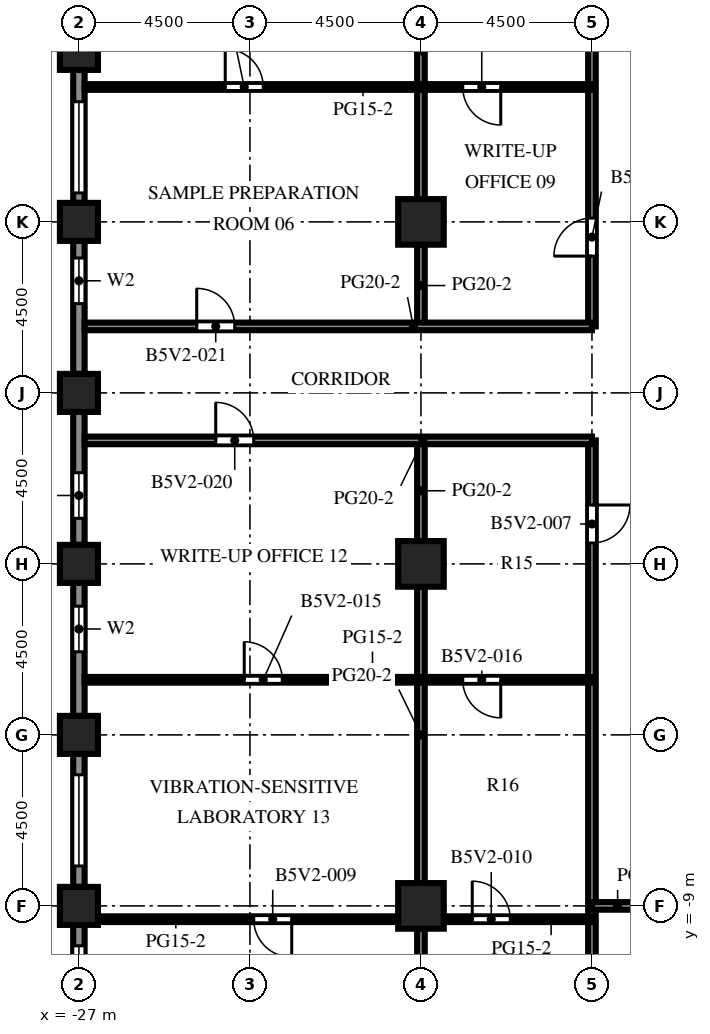
"""IFC4 building model, lengths in metres.
Left out: names, types, materials, properties, quantities, classifications, styles, units other than length and angle.
Written with IfcOpenShell. Run it as: python <this file> out.ifc"""

import sys

from ifc_helpers import new_model, si_unit, direction, frame, frame_2d, origin, origin_2d, place, context, subcontext, project, spatial, rectangle, extrude, element, fill, save


model = new_model("IFC4")
c1 = context("Model", 3, precision=1e-05, world=origin(), true_north=direction((0.0, 1.0)))
c2 = subcontext(c1, "Body", "Model", "MODEL_VIEW")
j1 = project(units=[si_unit("LENGTHUNIT", "METRE"), si_unit("PLANEANGLEUNIT", "RADIAN")], contexts=[c1])
p1 = place(None, origin())
s1 = spatial("IfcSite", under=j1, at=p1, CompositionType="ELEMENT")
p2 = place(p1, origin())
s2 = spatial("IfcBuilding", under=s1, at=p2, CompositionType="ELEMENT")
p3 = place(p2, frame((0.0, 0.0, 181.4)))
s3 = spatial("IfcBuildingStorey", under=s2, at=p3, CompositionType="ELEMENT", Elevation=181.4)
for number, where, z_axis, x_axis in (
    (1, (-27.0, -9.0, 0.0), (0.0, 0.0, 1.0), (1.0, 0.0, 0.0)),
    (2, (-27.0, -4.5, 0.0), (0.0, 0.0, 1.0), (1.0, 0.0, 0.0)),
    (3, (-27.0, 0.0, 0.0), (0.0, 0.0, 1.0), (1.0, 0.0, 0.0)),
    (4, (-27.0, 4.5, 0.0), (0.0, 0.0, 1.0), (1.0, 0.0, 0.0)),
    (5, (-27.0, 9.0, 0.0), (0.0, 0.0, 1.0), (1.0, 0.0, 0.0)),
    (6, (-27.0, 13.5, 0.0), (0.0, 0.0, 1.0), (1.0, 0.0, 0.0)),
):
    element("IfcColumn", number, at=place(p3, frame(where, z_axis=z_axis, x_axis=x_axis)), inside=s3, PredefinedType="COLUMN", context=c2, shape_type="SweptSolid", body=[
        extrude(rectangle(XDim=1.0, YDim=1.0, at=origin_2d()), origin(), (0.0, 0.0, 1.0), 4.1),
    ])
for number, where, z_axis, x_axis in (
    (7, (-18.0, -9.0, 0.0), (0.0, 0.0, 1.0), (1.0, 0.0, 0.0)),
    (8, (-18.0, 0.0, 0.0), (0.0, 0.0, 1.0), (1.0, 0.0, 0.0)),
    (9, (-18.0, 9.0, 0.0), (0.0, 0.0, 1.0), (1.0, 0.0, 0.0)),
):
    element("IfcColumn", number, at=place(p3, frame(where, z_axis=z_axis, x_axis=x_axis)), inside=s3, PredefinedType="COLUMN", context=c2, shape_type="SweptSolid", body=[
        extrude(rectangle(XDim=1.2, YDim=1.2, at=origin_2d()), origin(), (0.0, 0.0, 1.0), 4.1),
    ])
p4 = place(p3, frame((-27.0, 9.5, 0.0), z_axis=(0.0, 0.0, 1.0), x_axis=(0.0, 1.0, 0.0)))
e10 = element("IfcWall", 10, at=p4, inside=s3, PredefinedType="SOLIDWALL", context=c2, shape_type="SweptSolid", body=[
    extrude(rectangle(XDim=3.5, YDim=0.3, at=frame_2d((1.75, 0.0))), origin(), (0.0, 0.0, 1.0), 2.7),
])
p5 = place(p4, frame((0.262, 0.0, 0.8)))
e11 = element("IfcOpeningElement", 11, at=p5, cuts=e10, PredefinedType="OPENING", context=c2, shape_type="SweptSolid", body=[
    extrude(rectangle(XDim=2.4, YDim=1.7, at=frame_2d((1.2, 0.85))), frame((0.0, 0.16, 0.0), z_axis=(0.0, -1.0, 0.0), x_axis=(1.0, 0.0, 0.0)), (0.0, 0.0, 1.0), 0.32),
])
p6 = place(p3, frame((-27.0, 5.0, 0.0), z_axis=(0.0, 0.0, 1.0), x_axis=(0.0, 1.0, 0.0)))
e12 = element("IfcWall", 12, at=p6, inside=s3, PredefinedType="SOLIDWALL", context=c2, shape_type="SweptSolid", body=[
    extrude(rectangle(XDim=3.5, YDim=0.3, at=frame_2d((1.75, 0.0))), origin(), (0.0, 0.0, 1.0), 2.7),
])
p7 = place(p6, frame((1.85, 0.0, 0.8)))
e13 = element("IfcOpeningElement", 13, at=p7, cuts=e12, PredefinedType="OPENING", context=c2, shape_type="SweptSolid", body=[
    extrude(rectangle(XDim=1.2, YDim=1.7, at=frame_2d((0.6, 0.85))), frame((0.0, 0.16, 0.0), z_axis=(0.0, -1.0, 0.0), x_axis=(1.0, 0.0, 0.0)), (0.0, 0.0, 1.0), 0.32),
])
p8 = place(p3, frame((-27.0, 0.5, 0.0), z_axis=(0.0, 0.0, 1.0), x_axis=(0.0, 1.0, 0.0)))
e14 = element("IfcWall", 14, at=p8, inside=s3, PredefinedType="SOLIDWALL", context=c2, shape_type="SweptSolid", body=[
    extrude(rectangle(XDim=3.5, YDim=0.3, at=frame_2d((1.75, 0.0))), origin(), (0.0, 0.0, 1.0), 2.7),
])
p9 = place(p8, frame((0.7, 0.0, 0.8)))
e15 = element("IfcOpeningElement", 15, at=p9, cuts=e14, PredefinedType="OPENING", context=c2, shape_type="SweptSolid", body=[
    extrude(rectangle(XDim=1.2, YDim=1.7, at=frame_2d((0.6, 0.85))), frame((0.0, 0.16, 0.0), z_axis=(0.0, -1.0, 0.0), x_axis=(1.0, 0.0, 0.0)), (0.0, 0.0, 1.0), 0.32),
])
p10 = place(p3, frame((-27.0, -4.0, 0.0), z_axis=(0.0, 0.0, 1.0), x_axis=(0.0, 1.0, 0.0)))
e16 = element("IfcWall", 16, at=p10, inside=s3, PredefinedType="SOLIDWALL", context=c2, shape_type="SweptSolid", body=[
    extrude(rectangle(XDim=3.5, YDim=0.3, at=frame_2d((1.75, 0.0))), origin(), (0.0, 0.0, 1.0), 2.7),
])
p11 = place(p10, frame((1.688, 0.0, 0.8)))
e17 = element("IfcOpeningElement", 17, at=p11, cuts=e16, PredefinedType="OPENING", context=c2, shape_type="SweptSolid", body=[
    extrude(rectangle(XDim=1.2, YDim=1.7, at=frame_2d((0.6, 0.85))), frame((0.0, 0.16, 0.0), z_axis=(0.0, -1.0, 0.0), x_axis=(1.0, 0.0, 0.0)), (0.0, 0.0, 1.0), 0.32),
])
p12 = place(p3, frame((-27.0, -8.5, 0.0), z_axis=(0.0, 0.0, 1.0), x_axis=(0.0, 1.0, 0.0)))
e18 = element("IfcWall", 18, at=p12, inside=s3, PredefinedType="SOLIDWALL", context=c2, shape_type="SweptSolid", body=[
    extrude(rectangle(XDim=3.5, YDim=0.3, at=frame_2d((1.75, 0.0))), origin(), (0.0, 0.0, 1.0), 2.7),
])
p13 = place(p12, frame((0.55, 0.0, 0.8)))
e19 = element("IfcOpeningElement", 19, at=p13, cuts=e18, PredefinedType="OPENING", context=c2, shape_type="SweptSolid", body=[
    extrude(rectangle(XDim=2.4, YDim=1.7, at=frame_2d((1.2, 0.85))), frame((0.0, 0.16, 0.0), z_axis=(0.0, -1.0, 0.0), x_axis=(1.0, 0.0, 0.0)), (0.0, 0.0, 1.0), 0.32),
])
p14 = place(p3, frame((-27.0, -13.0, 0.0), z_axis=(0.0, 0.0, 1.0), x_axis=(0.0, 1.0, 0.0)))
e20 = element("IfcWall", 20, at=p14, inside=s3, PredefinedType="SOLIDWALL", context=c2, shape_type="SweptSolid", body=[
    extrude(rectangle(XDim=3.5, YDim=0.3, at=frame_2d((1.75, 0.0))), origin(), (0.0, 0.0, 1.0), 2.7),
])
p15 = place(p14, frame((0.55, 0.0, 0.8)))
e21 = element("IfcOpeningElement", 21, at=p15, cuts=e20, PredefinedType="OPENING", context=c2, shape_type="SweptSolid", body=[
    extrude(rectangle(XDim=2.4, YDim=1.7, at=frame_2d((1.2, 0.85))), frame((0.0, 0.16, 0.0), z_axis=(0.0, -1.0, 0.0), x_axis=(1.0, 0.0, 0.0)), (0.0, 0.0, 1.0), 0.32),
])
for number, where, z_axis, x_axis in (
    (22, (-18.0, -17.4, 0.0), (0.0, 0.0, 1.0), (0.0, 1.0, 0.0)),
    (23, (-18.0, -8.4, 0.0), (0.0, 0.0, 1.0), (0.0, 1.0, 0.0)),
):
    element("IfcWall", number, at=place(p3, frame(where, z_axis=z_axis, x_axis=x_axis)), inside=s3, PredefinedType="PARTITIONING", context=c2, shape_type="SweptSolid", body=[
        extrude(rectangle(XDim=7.8, YDim=0.2, at=frame_2d((3.9, 0.0))), origin(), (0.0, 0.0, 1.0), 3.5),
    ])
p16 = place(p3, frame((-18.0, 0.6, 0.0), z_axis=(0.0, 0.0, 1.0), x_axis=(0.0, 1.0, 0.0)))
e24 = element("IfcWall", 24, at=p16, inside=s3, PredefinedType="PARTITIONING", context=c2, shape_type="SweptSolid", body=[
    extrude(rectangle(XDim=2.65, YDim=0.2, at=frame_2d((1.325, 0.0))), origin(), (0.0, 0.0, 1.0), 3.5),
])
p17 = place(p3, frame((-18.0, 6.25, 0.0), z_axis=(0.0, 0.0, 1.0), x_axis=(0.0, 1.0, 0.0)))
e25 = element("IfcWall", 25, at=p17, inside=s3, PredefinedType="PARTITIONING", context=c2, shape_type="SweptSolid", body=[
    extrude(rectangle(XDim=2.15, YDim=0.2, at=frame_2d((1.075, 0.0))), origin(), (0.0, 0.0, 1.0), 3.5),
])
p18 = place(p3, frame((-18.0, 9.6, 0.0), z_axis=(0.0, 0.0, 1.0), x_axis=(0.0, 1.0, 0.0)))
e26 = element("IfcWall", 26, at=p18, inside=s3, PredefinedType="PARTITIONING", context=c2, shape_type="SweptSolid", body=[
    extrude(rectangle(XDim=7.8, YDim=0.2, at=frame_2d((3.9, 0.0))), origin(), (0.0, 0.0, 1.0), 3.5),
])
p19 = place(p3, frame((-13.5, -26.5, 0.0), z_axis=(0.0, 0.0, 1.0), x_axis=(0.0, 1.0, 0.0)))
e27 = element("IfcWall", 27, at=p19, inside=s3, PredefinedType="PARTITIONING", context=c2, shape_type="SweptSolid", body=[
    extrude(rectangle(XDim=29.75, YDim=0.2, at=frame_2d((14.875, 0.0))), origin(), (0.0, 0.0, 1.0), 3.5),
])
p20 = place(p19, frame((27.05, 0.0, 0.0)))
e28 = element("IfcOpeningElement", 28, at=p20, cuts=e27, PredefinedType="OPENING", context=c2, shape_type="SweptSolid", body=[
    extrude(rectangle(XDim=1.0, YDim=2.1, at=frame_2d((0.5, 1.05))), frame((0.0, 0.11, 0.0), z_axis=(0.0, -1.0, 0.0), x_axis=(1.0, 0.0, 0.0)), (0.0, 0.0, 1.0), 0.22),
])
p21 = place(p3, frame((-13.5, 6.25, 0.0), z_axis=(0.0, 0.0, 1.0), x_axis=(0.0, 1.0, 0.0)))
e29 = element("IfcWall", 29, at=p21, inside=s3, PredefinedType="PARTITIONING", context=c2, shape_type="SweptSolid", body=[
    extrude(rectangle(XDim=20.25, YDim=0.2, at=frame_2d((10.125, 0.0))), origin(), (0.0, 0.0, 1.0), 3.5),
])
p22 = place(p21, frame((1.85, 0.0, 0.0)))
e30 = element("IfcOpeningElement", 30, at=p22, cuts=e29, PredefinedType="OPENING", context=c2, shape_type="SweptSolid", body=[
    extrude(rectangle(XDim=1.0, YDim=2.1, at=frame_2d((0.5, 1.05))), frame((0.0, 0.11, 0.0), z_axis=(0.0, -1.0, 0.0), x_axis=(1.0, 0.0, 0.0)), (0.0, 0.0, 1.0), 0.22),
])
p23 = place(p3, frame((-18.6, -9.35, 0.0), z_axis=(0.0, 0.0, 1.0), x_axis=(-1.0, 0.0, 0.0)))
e31 = element("IfcWall", 31, at=p23, inside=s3, PredefinedType="PARTITIONING", context=c2, shape_type="SweptSolid", body=[
    extrude(rectangle(XDim=7.9, YDim=0.15, at=frame_2d((3.95, 0.0))), origin(), (0.0, 0.0, 1.0), 3.5),
])
p24 = place(p23, frame((2.8, 0.0, 0.0)))
e32 = element("IfcOpeningElement", 32, at=p24, cuts=e31, PredefinedType="OPENING", context=c2, shape_type="SweptSolid", body=[
    extrude(rectangle(XDim=1.0, YDim=2.1, at=frame_2d((0.5, 1.05))), frame((0.0, 0.085, 0.0), z_axis=(0.0, -1.0, 0.0), x_axis=(1.0, 0.0, 0.0)), (0.0, 0.0, 1.0), 0.17),
])
p25 = place(p3, frame((-13.5, -9.35, 0.0), z_axis=(0.0, 0.0, 1.0), x_axis=(-1.0, 0.0, 0.0)))
e33 = element("IfcWall", 33, at=p25, inside=s3, PredefinedType="PARTITIONING", context=c2, shape_type="SweptSolid", body=[
    extrude(rectangle(XDim=3.9, YDim=0.15, at=frame_2d((1.95, 0.0))), origin(), (0.0, 0.0, 1.0), 3.5),
])
p26 = place(p25, frame((2.15, 0.0, 0.0)))
e34 = element("IfcOpeningElement", 34, at=p26, cuts=e33, PredefinedType="OPENING", context=c2, shape_type="SweptSolid", body=[
    extrude(rectangle(XDim=1.0, YDim=2.1, at=frame_2d((0.5, 1.05))), frame((0.0, 0.085, 0.0), z_axis=(0.0, -1.0, 0.0), x_axis=(1.0, 0.0, 0.0)), (0.0, 0.0, 1.0), 0.17),
])
p27 = place(p3, frame((-10.5, -9.0, 0.0), z_axis=(0.0, 0.0, 1.0), x_axis=(-1.0, 0.0, 0.0)))
e35 = element("IfcWall", 35, at=p27, inside=s3, PredefinedType="PARTITIONING", context=c2, shape_type="SweptSolid", body=[
    extrude(rectangle(XDim=3.0, YDim=0.2, at=frame_2d((1.5, 0.0))), origin(), (0.0, 0.0, 1.0), 3.5),
])
p28 = place(p27, frame((0.65, 0.0, 0.0)))
e36 = element("IfcOpeningElement", 36, at=p28, cuts=e35, PredefinedType="OPENING", context=c2, shape_type="SweptSolid", body=[
    extrude(rectangle(XDim=1.0, YDim=2.1, at=frame_2d((0.5, 1.05))), frame((0.0, 0.11, 0.0), z_axis=(0.0, -1.0, 0.0), x_axis=(1.0, 0.0, 0.0)), (0.0, 0.0, 1.0), 0.22),
])
p29 = place(p3, frame((-13.5, -3.05, 0.0), z_axis=(0.0, 0.0, 1.0), x_axis=(-1.0, 0.0, 0.0)))
e37 = element("IfcWall", 37, at=p29, inside=s3, PredefinedType="PARTITIONING", context=c2, shape_type="SweptSolid", body=[
    extrude(rectangle(XDim=13.35, YDim=0.15, at=frame_2d((6.675, 0.0))), origin(), (0.0, 0.0, 1.0), 3.5),
])
p30 = place(p29, frame((8.15, 0.0, 0.0)))
e38 = element("IfcOpeningElement", 38, at=p30, cuts=e37, PredefinedType="OPENING", context=c2, shape_type="SweptSolid", body=[
    extrude(rectangle(XDim=1.0, YDim=2.1, at=frame_2d((0.5, 1.05))), frame((0.0, 0.085, 0.0), z_axis=(0.0, -1.0, 0.0), x_axis=(1.0, 0.0, 0.0)), (0.0, 0.0, 1.0), 0.17),
])
p31 = place(p29, frame((2.4, 0.0, 0.0)))
e39 = element("IfcOpeningElement", 39, at=p31, cuts=e37, PredefinedType="OPENING", context=c2, shape_type="SweptSolid", body=[
    extrude(rectangle(XDim=1.0, YDim=2.1, at=frame_2d((0.5, 1.05))), frame((0.0, 0.085, 0.0), z_axis=(0.0, -1.0, 0.0), x_axis=(1.0, 0.0, 0.0)), (0.0, 0.0, 1.0), 0.17),
])
p32 = place(p3, frame((-13.5, 3.25, 0.0), z_axis=(0.0, 0.0, 1.0), x_axis=(-1.0, 0.0, 0.0)))
e40 = element("IfcWall", 40, at=p32, inside=s3, PredefinedType="PARTITIONING", context=c2, shape_type="SweptSolid", body=[
    extrude(rectangle(XDim=13.35, YDim=0.2, at=frame_2d((6.675, 0.0))), origin(), (0.0, 0.0, 1.0), 3.5),
])
p33 = place(p32, frame((8.9, 0.0, 0.0)))
e41 = element("IfcOpeningElement", 41, at=p33, cuts=e40, PredefinedType="OPENING", context=c2, shape_type="SweptSolid", body=[
    extrude(rectangle(XDim=1.0, YDim=2.1, at=frame_2d((0.5, 1.05))), frame((0.0, 0.11, 0.0), z_axis=(0.0, -1.0, 0.0), x_axis=(1.0, 0.0, 0.0)), (0.0, 0.0, 1.0), 0.22),
])
p34 = place(p3, frame((-26.85, 6.25, 0.0), z_axis=(0.0, 0.0, 1.0), x_axis=(1.0, 0.0, 0.0)))
e42 = element("IfcWall", 42, at=p34, inside=s3, PredefinedType="PARTITIONING", context=c2, shape_type="SweptSolid", body=[
    extrude(rectangle(XDim=13.35, YDim=0.2, at=frame_2d((6.675, 0.0))), origin(), (0.0, 0.0, 1.0), 3.5),
])
p35 = place(p34, frame((2.95, 0.0, 0.0)))
e43 = element("IfcOpeningElement", 43, at=p35, cuts=e42, PredefinedType="OPENING", context=c2, shape_type="SweptSolid", body=[
    extrude(rectangle(XDim=1.0, YDim=2.1, at=frame_2d((0.5, 1.05))), frame((0.0, 0.11, 0.0), z_axis=(0.0, -1.0, 0.0), x_axis=(1.0, 0.0, 0.0)), (0.0, 0.0, 1.0), 0.22),
])
p36 = place(p3, frame((-26.85, 12.55, 0.0), z_axis=(0.0, 0.0, 1.0), x_axis=(1.0, 0.0, 0.0)))
e44 = element("IfcWall", 44, at=p36, inside=s3, PredefinedType="PARTITIONING", context=c2, shape_type="SweptSolid", body=[
    extrude(rectangle(XDim=13.35, YDim=0.15, at=frame_2d((6.675, 0.0))), origin(), (0.0, 0.0, 1.0), 3.5),
])
p37 = place(p36, frame((3.7, 0.0, 0.0)))
e45 = element("IfcOpeningElement", 45, at=p37, cuts=e44, PredefinedType="OPENING", context=c2, shape_type="SweptSolid", body=[
    extrude(rectangle(XDim=1.0, YDim=2.1, at=frame_2d((0.5, 1.05))), frame((0.0, 0.085, 0.0), z_axis=(0.0, -1.0, 0.0), x_axis=(1.0, 0.0, 0.0)), (0.0, 0.0, 1.0), 0.17),
])
p38 = place(p36, frame((9.95, 0.0, 0.0)))
e46 = element("IfcOpeningElement", 46, at=p38, cuts=e44, PredefinedType="OPENING", context=c2, shape_type="SweptSolid", body=[
    extrude(rectangle(XDim=1.0, YDim=2.1, at=frame_2d((0.5, 1.05))), frame((0.0, 0.085, 0.0), z_axis=(0.0, -1.0, 0.0), x_axis=(1.0, 0.0, 0.0)), (0.0, 0.0, 1.0), 0.17),
])
p39 = place(p5, origin())
e47 = element("IfcWindow", 47, at=p39, inside=s3, PartitioningType="SINGLE_PANEL", PredefinedType="WINDOW", context=c2, shape_type="SweptSolid", body=[
    extrude(rectangle(XDim=2.4, YDim=1.7, at=frame_2d((1.2, 0.85))), frame((0.0, 0.03, 0.0), z_axis=(0.0, -1.0, 0.0), x_axis=(1.0, 0.0, 0.0)), (0.0, 0.0, 1.0), 0.06),
])
fill(e11, e47)
p40 = place(p7, origin())
e48 = element("IfcWindow", 48, at=p40, inside=s3, PartitioningType="SINGLE_PANEL", PredefinedType="WINDOW", context=c2, shape_type="SweptSolid", body=[
    extrude(rectangle(XDim=1.2, YDim=1.7, at=frame_2d((0.6, 0.85))), frame((0.0, 0.03, 0.0), z_axis=(0.0, -1.0, 0.0), x_axis=(1.0, 0.0, 0.0)), (0.0, 0.0, 1.0), 0.06),
])
fill(e13, e48)
p41 = place(p9, origin())
e49 = element("IfcWindow", 49, at=p41, inside=s3, PartitioningType="SINGLE_PANEL", PredefinedType="WINDOW", context=c2, shape_type="SweptSolid", body=[
    extrude(rectangle(XDim=1.2, YDim=1.7, at=frame_2d((0.6, 0.85))), frame((0.0, 0.03, 0.0), z_axis=(0.0, -1.0, 0.0), x_axis=(1.0, 0.0, 0.0)), (0.0, 0.0, 1.0), 0.06),
])
fill(e15, e49)
p42 = place(p11, origin())
e50 = element("IfcWindow", 50, at=p42, inside=s3, PartitioningType="SINGLE_PANEL", PredefinedType="WINDOW", context=c2, shape_type="SweptSolid", body=[
    extrude(rectangle(XDim=1.2, YDim=1.7, at=frame_2d((0.6, 0.85))), frame((0.0, 0.03, 0.0), z_axis=(0.0, -1.0, 0.0), x_axis=(1.0, 0.0, 0.0)), (0.0, 0.0, 1.0), 0.06),
])
fill(e17, e50)
p43 = place(p13, origin())
e51 = element("IfcWindow", 51, at=p43, inside=s3, PartitioningType="SINGLE_PANEL", PredefinedType="WINDOW", context=c2, shape_type="SweptSolid", body=[
    extrude(rectangle(XDim=2.4, YDim=1.7, at=frame_2d((1.2, 0.85))), frame((0.0, 0.03, 0.0), z_axis=(0.0, -1.0, 0.0), x_axis=(1.0, 0.0, 0.0)), (0.0, 0.0, 1.0), 0.06),
])
fill(e19, e51)
p44 = place(p15, origin())
e52 = element("IfcWindow", 52, at=p44, inside=s3, PartitioningType="SINGLE_PANEL", PredefinedType="WINDOW", context=c2, shape_type="SweptSolid", body=[
    extrude(rectangle(XDim=2.4, YDim=1.7, at=frame_2d((1.2, 0.85))), frame((0.0, 0.03, 0.0), z_axis=(0.0, -1.0, 0.0), x_axis=(1.0, 0.0, 0.0)), (0.0, 0.0, 1.0), 0.06),
])
fill(e21, e52)
p45 = place(p20, origin())
e53 = element("IfcDoor", 53, at=p45, inside=s3, OperationType="SINGLE_SWING_RIGHT", PredefinedType="DOOR", context=c2, shape_type="SweptSolid", body=[
    extrude(rectangle(XDim=1.0, YDim=2.1, at=frame_2d((0.5, 1.05))), frame((0.0, 0.025, 0.0), z_axis=(0.0, -1.0, 0.0), x_axis=(1.0, 0.0, 0.0)), (0.0, 0.0, 1.0), 0.05),
])
fill(e28, e53)
p46 = place(p22, origin())
e54 = element("IfcDoor", 54, at=p46, inside=s3, OperationType="SINGLE_SWING_LEFT", PredefinedType="DOOR", context=c2, shape_type="SweptSolid", body=[
    extrude(rectangle(XDim=1.0, YDim=2.1, at=frame_2d((0.5, 1.05))), frame((0.0, 0.025, 0.0), z_axis=(0.0, -1.0, 0.0), x_axis=(1.0, 0.0, 0.0)), (0.0, 0.0, 1.0), 0.05),
])
fill(e30, e54)
p47 = place(p24, origin())
e55 = element("IfcDoor", 55, at=p47, inside=s3, OperationType="SINGLE_SWING_LEFT", PredefinedType="DOOR", context=c2, shape_type="SweptSolid", body=[
    extrude(rectangle(XDim=1.0, YDim=2.1, at=frame_2d((0.5, 1.05))), frame((0.0, 0.025, 0.0), z_axis=(0.0, -1.0, 0.0), x_axis=(1.0, 0.0, 0.0)), (0.0, 0.0, 1.0), 0.05),
])
fill(e32, e55)
p48 = place(p26, origin())
e56 = element("IfcDoor", 56, at=p48, inside=s3, OperationType="SINGLE_SWING_RIGHT", PredefinedType="DOOR", context=c2, shape_type="SweptSolid", body=[
    extrude(rectangle(XDim=1.0, YDim=2.1, at=frame_2d((0.5, 1.05))), frame((0.0, 0.025, 0.0), z_axis=(0.0, -1.0, 0.0), x_axis=(1.0, 0.0, 0.0)), (0.0, 0.0, 1.0), 0.05),
])
fill(e34, e56)
p49 = place(p30, origin())
e57 = element("IfcDoor", 57, at=p49, inside=s3, OperationType="SINGLE_SWING_RIGHT", PredefinedType="DOOR", context=c2, shape_type="SweptSolid", body=[
    extrude(rectangle(XDim=1.0, YDim=2.1, at=frame_2d((0.5, 1.05))), frame((0.0, 0.025, 0.0), z_axis=(0.0, -1.0, 0.0), x_axis=(1.0, 0.0, 0.0)), (0.0, 0.0, 1.0), 0.05),
])
fill(e38, e57)
p50 = place(p31, origin())
e58 = element("IfcDoor", 58, at=p50, inside=s3, OperationType="SINGLE_SWING_LEFT", PredefinedType="DOOR", context=c2, shape_type="SweptSolid", body=[
    extrude(rectangle(XDim=1.0, YDim=2.1, at=frame_2d((0.5, 1.05))), frame((0.0, 0.025, 0.0), z_axis=(0.0, -1.0, 0.0), x_axis=(1.0, 0.0, 0.0)), (0.0, 0.0, 1.0), 0.05),
])
fill(e39, e58)
p51 = place(p33, origin())
e59 = element("IfcDoor", 59, at=p51, inside=s3, OperationType="SINGLE_SWING_RIGHT", PredefinedType="DOOR", context=c2, shape_type="SweptSolid", body=[
    extrude(rectangle(XDim=1.0, YDim=2.1, at=frame_2d((0.5, 1.05))), frame((0.0, 0.025, 0.0), z_axis=(0.0, -1.0, 0.0), x_axis=(1.0, 0.0, 0.0)), (0.0, 0.0, 1.0), 0.05),
])
fill(e41, e59)
p52 = place(p35, origin())
e60 = element("IfcDoor", 60, at=p52, inside=s3, OperationType="SINGLE_SWING_LEFT", PredefinedType="DOOR", context=c2, shape_type="SweptSolid", body=[
    extrude(rectangle(XDim=1.0, YDim=2.1, at=frame_2d((0.5, 1.05))), frame((0.0, 0.025, 0.0), z_axis=(0.0, -1.0, 0.0), x_axis=(1.0, 0.0, 0.0)), (0.0, 0.0, 1.0), 0.05),
])
fill(e43, e60)
p53 = place(p37, origin())
e61 = element("IfcDoor", 61, at=p53, inside=s3, OperationType="SINGLE_SWING_LEFT", PredefinedType="DOOR", context=c2, shape_type="SweptSolid", body=[
    extrude(rectangle(XDim=1.0, YDim=2.1, at=frame_2d((0.5, 1.05))), frame((0.0, 0.025, 0.0), z_axis=(0.0, -1.0, 0.0), x_axis=(1.0, 0.0, 0.0)), (0.0, 0.0, 1.0), 0.05),
])
fill(e45, e61)
p54 = place(p38, origin())
e62 = element("IfcDoor", 62, at=p54, inside=s3, OperationType="SINGLE_SWING_RIGHT", PredefinedType="DOOR", context=c2, shape_type="SweptSolid", body=[
    extrude(rectangle(XDim=1.0, YDim=2.1, at=frame_2d((0.5, 1.05))), frame((0.0, 0.025, 0.0), z_axis=(0.0, -1.0, 0.0), x_axis=(1.0, 0.0, 0.0)), (0.0, 0.0, 1.0), 0.05),
])
fill(e46, e62)
save(model, sys.argv[1])
